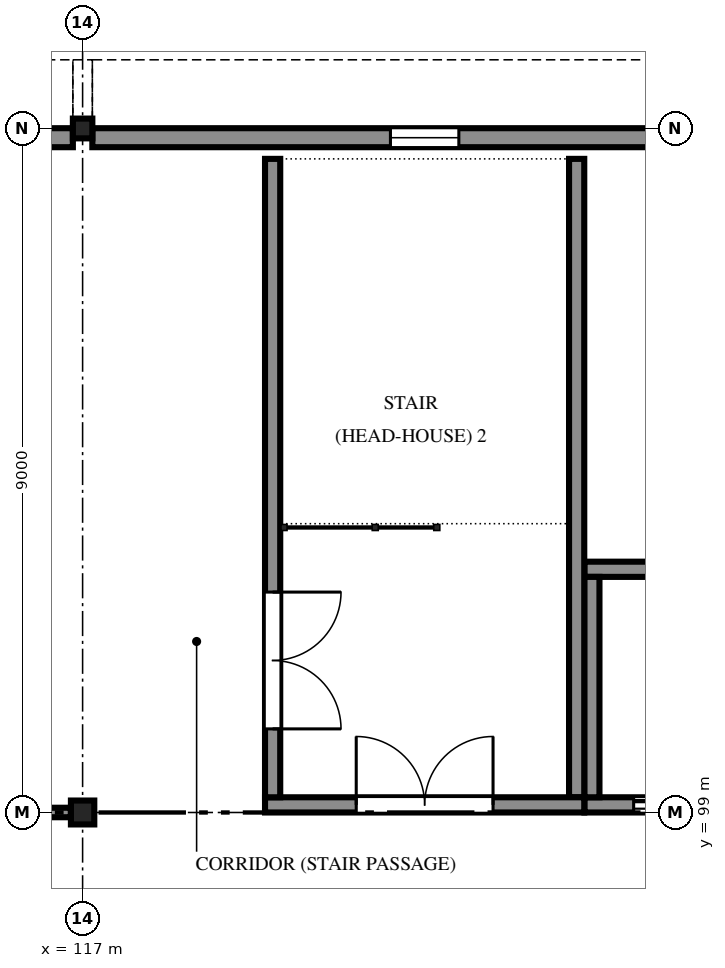
"""IFC4 building model, lengths in metres.
Left out: names, types, materials, properties, quantities, classifications, styles, units other than length and angle.
Written with IfcOpenShell. Run it as: python <this file> out.ifc"""

import sys

from ifc_helpers import new_model, si_unit, direction, frame, frame_2d, origin, origin_2d, place, context, subcontext, project, spatial, polyline, rectangle, i_section, outline, extrude, element, fill, save


model = new_model("IFC4")
c1 = context("Model", 3, precision=1e-05, world=origin(), true_north=direction((0.0, 1.0)))
c2 = subcontext(c1, "Body", "Model", "MODEL_VIEW")
j1 = project(units=[si_unit("LENGTHUNIT", "METRE"), si_unit("PLANEANGLEUNIT", "RADIAN")], contexts=[c1])
p1 = place(None, origin())
s1 = spatial("IfcSite", under=j1, at=p1, CompositionType="ELEMENT")
p2 = place(p1, origin())
s2 = spatial("IfcBuilding", under=s1, at=p2, CompositionType="ELEMENT")
p3 = place(p2, frame((0.0, 0.0, 7.5)))
s3 = spatial("IfcBuildingStorey", under=s2, at=p3, CompositionType="ELEMENT", Elevation=7.5)
p4 = place(p3, frame((117.0, 99.0, 0.0), z_axis=(0.0, 0.0, 1.0), x_axis=(1.0, 0.0, 0.0)))
e1 = element("IfcColumn", 1, at=p4, inside=s3, PredefinedType="COLUMN", context=c2, shape_type="SweptSolid", body=[
    extrude(i_section(OverallWidth=0.307, OverallDepth=0.314, WebThickness=0.012, FlangeThickness=0.019, FilletRadius=0.015, at=origin_2d()), origin(), (0.0, 0.0, 1.0), 4.2),
])
p5 = place(p3, frame((117.0, 108.0, 0.0), z_axis=(0.0, 0.0, 1.0), x_axis=(1.0, 0.0, 0.0)))
e2 = element("IfcColumn", 2, at=p5, inside=s3, PredefinedType="COLUMN", context=c2, shape_type="SweptSolid", body=[
    extrude(i_section(OverallWidth=0.256, OverallDepth=0.26, WebThickness=0.01, FlangeThickness=0.017, FilletRadius=0.013, at=origin_2d()), origin(), (0.0, 0.0, 1.0), 4.2),
])
p6 = place(p3, frame((108.128, 107.878, 0.0), z_axis=(0.0, 0.0, 1.0), x_axis=(1.0, 0.0, 0.0)))
e3 = element("IfcWall", 3, at=p6, inside=s3, PredefinedType="SOLIDWALL", context=c2, shape_type="SweptSolid", body=[
    extrude(rectangle(XDim=8.744, YDim=0.25, at=frame_2d((4.372, 0.0))), origin(), (0.0, 0.0, 1.0), 4.05),
])
p7 = place(p6, frame((0.622, 0.0, 0.9)))
e4 = element("IfcOpeningElement", 4, at=p7, cuts=e3, PredefinedType="OPENING", context=c2, shape_type="SweptSolid", body=[
    extrude(rectangle(XDim=1.5, YDim=2.4, at=frame_2d((0.75, 1.2))), frame((0.0, 0.135, 0.0), z_axis=(0.0, -1.0, 0.0), x_axis=(1.0, 0.0, 0.0)), (0.0, 0.0, 1.0), 0.27),
])
p8 = place(p6, frame((3.622, 0.0, 0.9)))
e5 = element("IfcOpeningElement", 5, at=p8, cuts=e3, PredefinedType="OPENING", context=c2, shape_type="SweptSolid", body=[
    extrude(rectangle(XDim=1.5, YDim=2.4, at=frame_2d((0.75, 1.2))), frame((0.0, 0.135, 0.0), z_axis=(0.0, -1.0, 0.0), x_axis=(1.0, 0.0, 0.0)), (0.0, 0.0, 1.0), 0.27),
])
p9 = place(p6, frame((6.622, 0.0, 0.9)))
e6 = element("IfcOpeningElement", 6, at=p9, cuts=e3, PredefinedType="OPENING", context=c2, shape_type="SweptSolid", body=[
    extrude(rectangle(XDim=1.5, YDim=2.4, at=frame_2d((0.75, 1.2))), frame((0.0, 0.135, 0.0), z_axis=(0.0, -1.0, 0.0), x_axis=(1.0, 0.0, 0.0)), (0.0, 0.0, 1.0), 0.27),
])
p10 = place(p3, frame((117.128, 107.878, 0.0), z_axis=(0.0, 0.0, 1.0), x_axis=(1.0, 0.0, 0.0)))
e7 = element("IfcWall", 7, at=p10, inside=s3, PredefinedType="SOLIDWALL", context=c2, shape_type="SweptSolid", body=[
    extrude(rectangle(XDim=8.744, YDim=0.25, at=frame_2d((4.372, 0.0))), origin(), (0.0, 0.0, 1.0), 4.05),
])
p11 = place(p10, frame((3.922, 0.0, 1.2)))
e8 = element("IfcOpeningElement", 8, at=p11, cuts=e7, PredefinedType="OPENING", context=c2, shape_type="SweptSolid", body=[
    extrude(rectangle(XDim=0.9, YDim=1.8, at=frame_2d((0.45, 0.9))), frame((0.0, 0.135, 0.0), z_axis=(0.0, -1.0, 0.0), x_axis=(1.0, 0.0, 0.0)), (0.0, 0.0, 1.0), 0.27),
])
p12 = place(p3, frame((119.4, 99.1, -0.13), z_axis=(0.0, 0.0, 1.0), x_axis=(1.0, 0.0, 0.0)))
e9 = element("IfcWall", 9, at=p12, inside=s3, PredefinedType="SOLIDWALL", context=c2, shape_type="SweptSolid", body=[
    extrude(rectangle(XDim=4.2, YDim=0.2, at=frame_2d((2.1, 0.0))), origin(), (0.0, 0.0, 1.0), 3.72),
])
p13 = place(p12, frame((1.2, 0.0, 0.13)))
e10 = element("IfcOpeningElement", 10, at=p13, cuts=e9, PredefinedType="OPENING", context=c2, shape_type="SweptSolid", body=[
    extrude(rectangle(XDim=1.8, YDim=2.1, at=frame_2d((0.9, 1.05))), frame((0.0, 0.11, 0.0), z_axis=(0.0, -1.0, 0.0), x_axis=(1.0, 0.0, 0.0)), (0.0, 0.0, 1.0), 0.22),
])
p14 = place(p3, frame((119.5, 99.2, -0.13), z_axis=(0.0, 0.0, 1.0), x_axis=(0.0, 1.0, 0.0)))
e11 = element("IfcWall", 11, at=p14, inside=s3, PredefinedType="SOLIDWALL", context=c2, shape_type="SweptSolid", body=[
    extrude(rectangle(XDim=8.4, YDim=0.2, at=frame_2d((4.2, 0.0))), origin(), (0.0, 0.0, 1.0), 3.72),
])
p15 = place(p14, frame((0.9, 0.0, 0.13)))
e12 = element("IfcOpeningElement", 12, at=p15, cuts=e11, PredefinedType="OPENING", context=c2, shape_type="SweptSolid", body=[
    extrude(rectangle(XDim=1.8, YDim=2.1, at=frame_2d((0.9, 1.05))), frame((0.0, 0.11, 0.0), z_axis=(0.0, -1.0, 0.0), x_axis=(1.0, 0.0, 0.0)), (0.0, 0.0, 1.0), 0.22),
])
p16 = place(p3, frame((123.5, 99.2, -0.13), z_axis=(0.0, 0.0, 1.0), x_axis=(0.0, 1.0, 0.0)))
e13 = element("IfcWall", 13, at=p16, inside=s3, PredefinedType="SOLIDWALL", context=c2, shape_type="SweptSolid", body=[
    extrude(rectangle(XDim=8.4, YDim=0.2, at=frame_2d((4.2, 0.0))), origin(), (0.0, 0.0, 1.0), 3.72),
])
p17 = place(p3, frame((123.602, 99.1, 0.0), z_axis=(0.0, 0.0, 1.0), x_axis=(1.0, 0.0, 0.0)))
e14 = element("IfcWall", 14, at=p17, inside=s3, PredefinedType="SOLIDWALL", context=c2, shape_type="SweptSolid", body=[
    extrude(rectangle(XDim=2.398, YDim=0.2, at=frame_2d((1.199, 0.0))), origin(), (0.0, 0.0, 1.0), 3.516),
])
p18 = place(p17, frame((0.648, 0.0, 0.0)))
e15 = element("IfcOpeningElement", 15, at=p18, cuts=e14, PredefinedType="OPENING", context=c2, shape_type="SweptSolid", body=[
    extrude(rectangle(XDim=1.1, YDim=2.1, at=frame_2d((0.55, 1.05))), frame((0.0, 0.11, 0.0), z_axis=(0.0, -1.0, 0.0), x_axis=(1.0, 0.0, 0.0)), (0.0, 0.0, 1.0), 0.22),
])
p19 = place(p3, frame((123.602, 102.2, 0.0), z_axis=(0.0, 0.0, 1.0), x_axis=(1.0, 0.0, 0.0)))
e16 = element("IfcWall", 16, at=p19, inside=s3, PredefinedType="SOLIDWALL", context=c2, shape_type="SweptSolid", body=[
    extrude(rectangle(XDim=2.398, YDim=0.2, at=frame_2d((1.199, 0.0))), origin(), (0.0, 0.0, 1.0), 3.516),
])
p20 = place(p3, frame((123.7, 99.2, 0.0), z_axis=(0.0, 0.0, 1.0), x_axis=(0.0, 1.0, 0.0)))
e17 = element("IfcWall", 17, at=p20, inside=s3, PredefinedType="SOLIDWALL", context=c2, shape_type="SweptSolid", body=[
    extrude(rectangle(XDim=2.9, YDim=0.2, at=frame_2d((1.45, 0.0))), origin(), (0.0, 0.0, 1.0), 3.516),
])
p21 = place(p3, frame((108.154, 99.0, 0.0), z_axis=(0.0, 0.0, 1.0), x_axis=(1.0, 0.0, 0.0)))
e18 = element("IfcWall", 18, at=p21, inside=s3, PredefinedType="PARTITIONING", context=c2, shape_type="SweptSolid", body=[
    extrude(rectangle(XDim=8.692, YDim=0.125, at=frame_2d((4.346, 0.0))), origin(), (0.0, 0.0, 1.0), 3.307),
])
p22 = place(p21, frame((3.846, 0.0, 0.0)))
e19 = element("IfcOpeningElement", 19, at=p22, cuts=e18, PredefinedType="OPENING", context=c2, shape_type="SweptSolid", body=[
    extrude(rectangle(XDim=1.0, YDim=2.1, at=frame_2d((0.5, 1.05))), frame((0.0, 0.073, 0.0), z_axis=(0.0, -1.0, 0.0), x_axis=(1.0, 0.0, 0.0)), (0.0, 0.0, 1.0), 0.145),
])
p23 = place(p11, origin())
e20 = element("IfcWindow", 20, at=p23, inside=s3, PartitioningType="SINGLE_PANEL", PredefinedType="WINDOW", context=c2, shape_type="SweptSolid", body=[
    extrude(outline(polyline([(0.0, 0.0), (0.9, 0.0), (0.9, 1.8), (0.0, 1.8), (0.0, 0.0)]), holes=[polyline([(0.07, 0.07), (0.83, 0.07), (0.83, 1.73), (0.07, 1.73), (0.07, 0.07)])]), frame((0.0, 0.03, 0.0), z_axis=(0.0, -1.0, 0.0), x_axis=(1.0, 0.0, 0.0)), (0.0, 0.0, 1.0), 0.06),
    extrude(outline(polyline([(0.07, 0.07), (0.83, 0.07), (0.83, 1.73), (0.07, 1.73), (0.07, 0.07)]), holes=[polyline([(0.1, 0.1), (0.8, 0.1), (0.8, 1.7), (0.1, 1.7), (0.1, 0.1)])]), frame((0.0, 0.022, 0.0), z_axis=(0.0, -1.0, 0.0), x_axis=(1.0, 0.0, 0.0)), (0.0, 0.0, 1.0), 0.045),
    extrude(rectangle(XDim=0.7, YDim=1.6, at=frame_2d((0.45, 0.9))), frame((0.0, 0.006, 0.0), z_axis=(0.0, -1.0, 0.0), x_axis=(1.0, 0.0, 0.0)), (0.0, 0.0, 1.0), 0.012),
])
fill(e8, e20)
p24 = place(p18, origin())
e21 = element("IfcDoor", 21, at=p24, inside=s3, OperationType="SLIDING_TO_LEFT", PredefinedType="DOOR", context=c2, shape_type="SweptSolid", body=[
    extrude(outline(polyline([(0.0, 0.0), (0.07, 0.0), (0.07, 2.03), (1.03, 2.03), (1.03, 0.0), (1.1, 0.0), (1.1, 2.1), (0.0, 2.1), (0.0, 0.0)])), frame((0.0, 0.025, 0.0), z_axis=(0.0, -1.0, 0.0), x_axis=(1.0, 0.0, 0.0)), (0.0, 0.0, 1.0), 0.05),
    extrude(rectangle(XDim=0.524, YDim=2.016, at=frame_2d((0.336, 1.018))), frame((0.0, 0.018, 0.0), z_axis=(0.0, -1.0, 0.0), x_axis=(1.0, 0.0, 0.0)), (0.0, 0.0, 1.0), 0.016),
    extrude(rectangle(XDim=0.52, YDim=2.016, at=frame_2d((0.766, 1.018))), frame((0.0, -0.002, 0.0), z_axis=(0.0, -1.0, 0.0), x_axis=(1.0, 0.0, 0.0)), (0.0, 0.0, 1.0), 0.016),
])
fill(e15, e21)
p25 = place(p15, frame((1.8, 0.0, 0.0), z_axis=(0.0, 0.0, 1.0), x_axis=(-1.0, 0.0, 0.0)))
e22 = element("IfcDoor", 22, at=p25, inside=s3, OperationType="DOUBLE_DOOR_SINGLE_SWING", PredefinedType="DOOR", context=c2, shape_type="SweptSolid", body=[
    extrude(outline(polyline([(0.0, 0.0), (0.07, 0.0), (0.07, 2.03), (1.73, 2.03), (1.73, 0.0), (1.8, 0.0), (1.8, 2.1), (0.0, 2.1), (0.0, 0.0)])), frame((0.0, 0.025, 0.0), z_axis=(0.0, -1.0, 0.0), x_axis=(1.0, 0.0, 0.0)), (0.0, 0.0, 1.0), 0.05),
    extrude(outline(polyline([(0.074, 0.01), (0.897, 0.01), (0.897, 2.026), (0.074, 2.026), (0.074, 0.01)]), holes=[polyline([(0.194, 0.16), (0.777, 0.16), (0.777, 1.01), (0.194, 1.01), (0.194, 0.16)]), polyline([(0.335, 1.16), (0.635, 1.16), (0.635, 1.76), (0.335, 1.76), (0.335, 1.16)])]), frame((0.0, 0.017, 0.0), z_axis=(0.0, -1.0, 0.0), x_axis=(1.0, 0.0, 0.0)), (0.0, 0.0, 1.0), 0.035),
    extrude(rectangle(XDim=0.583, YDim=0.85, at=frame_2d((0.485, 0.585))), frame((0.0, 0.009, 0.0), z_axis=(0.0, -1.0, 0.0), x_axis=(1.0, 0.0, 0.0)), (0.0, 0.0, 1.0), 0.017),
    extrude(rectangle(XDim=0.3, YDim=0.6, at=frame_2d((0.485, 1.46))), frame((0.0, 0.006, 0.0), z_axis=(0.0, -1.0, 0.0), x_axis=(1.0, 0.0, 0.0)), (0.0, 0.0, 1.0), 0.012),
    extrude(outline(polyline([(0.903, 0.01), (1.726, 0.01), (1.726, 2.026), (0.903, 2.026), (0.903, 0.01)]), holes=[polyline([(1.023, 0.16), (1.606, 0.16), (1.606, 1.01), (1.023, 1.01), (1.023, 0.16)]), polyline([(1.165, 1.16), (1.465, 1.16), (1.465, 1.76), (1.165, 1.76), (1.165, 1.16)])]), frame((0.0, 0.017, 0.0), z_axis=(0.0, -1.0, 0.0), x_axis=(1.0, 0.0, 0.0)), (0.0, 0.0, 1.0), 0.035),
    extrude(rectangle(XDim=0.583, YDim=0.85, at=frame_2d((1.314, 0.585))), frame((0.0, 0.009, 0.0), z_axis=(0.0, -1.0, 0.0), x_axis=(1.0, 0.0, 0.0)), (0.0, 0.0, 1.0), 0.017),
    extrude(rectangle(XDim=0.3, YDim=0.6, at=frame_2d((1.314, 1.46))), frame((0.0, 0.006, 0.0), z_axis=(0.0, -1.0, 0.0), x_axis=(1.0, 0.0, 0.0)), (0.0, 0.0, 1.0), 0.012),
])
fill(e12, e22)
p26 = place(p13, origin())
e23 = element("IfcDoor", 23, at=p26, inside=s3, OperationType="DOUBLE_DOOR_SINGLE_SWING", PredefinedType="DOOR", context=c2, shape_type="SweptSolid", body=[
    extrude(outline(polyline([(0.0, 0.0), (0.07, 0.0), (0.07, 2.03), (1.73, 2.03), (1.73, 0.0), (1.8, 0.0), (1.8, 2.1), (0.0, 2.1), (0.0, 0.0)])), frame((0.0, 0.025, 0.0), z_axis=(0.0, -1.0, 0.0), x_axis=(1.0, 0.0, 0.0)), (0.0, 0.0, 1.0), 0.05),
    extrude(outline(polyline([(0.074, 0.01), (0.897, 0.01), (0.897, 2.026), (0.074, 2.026), (0.074, 0.01)]), holes=[polyline([(0.194, 0.16), (0.777, 0.16), (0.777, 1.01), (0.194, 1.01), (0.194, 0.16)]), polyline([(0.335, 1.16), (0.635, 1.16), (0.635, 1.76), (0.335, 1.76), (0.335, 1.16)])]), frame((0.0, 0.017, 0.0), z_axis=(0.0, -1.0, 0.0), x_axis=(1.0, 0.0, 0.0)), (0.0, 0.0, 1.0), 0.035),
    extrude(rectangle(XDim=0.583, YDim=0.85, at=frame_2d((0.485, 0.585))), frame((0.0, 0.009, 0.0), z_axis=(0.0, -1.0, 0.0), x_axis=(1.0, 0.0, 0.0)), (0.0, 0.0, 1.0), 0.017),
    extrude(rectangle(XDim=0.3, YDim=0.6, at=frame_2d((0.485, 1.46))), frame((0.0, 0.006, 0.0), z_axis=(0.0, -1.0, 0.0), x_axis=(1.0, 0.0, 0.0)), (0.0, 0.0, 1.0), 0.012),
    extrude(outline(polyline([(0.903, 0.01), (1.726, 0.01), (1.726, 2.026), (0.903, 2.026), (0.903, 0.01)]), holes=[polyline([(1.023, 0.16), (1.606, 0.16), (1.606, 1.01), (1.023, 1.01), (1.023, 0.16)]), polyline([(1.165, 1.16), (1.465, 1.16), (1.465, 1.76), (1.165, 1.76), (1.165, 1.16)])]), frame((0.0, 0.017, 0.0), z_axis=(0.0, -1.0, 0.0), x_axis=(1.0, 0.0, 0.0)), (0.0, 0.0, 1.0), 0.035),
    extrude(rectangle(XDim=0.583, YDim=0.85, at=frame_2d((1.314, 0.585))), frame((0.0, 0.009, 0.0), z_axis=(0.0, -1.0, 0.0), x_axis=(1.0, 0.0, 0.0)), (0.0, 0.0, 1.0), 0.017),
    extrude(rectangle(XDim=0.3, YDim=0.6, at=frame_2d((1.314, 1.46))), frame((0.0, 0.006, 0.0), z_axis=(0.0, -1.0, 0.0), x_axis=(1.0, 0.0, 0.0)), (0.0, 0.0, 1.0), 0.012),
])
fill(e10, e23)
save(model, sys.argv[1])
